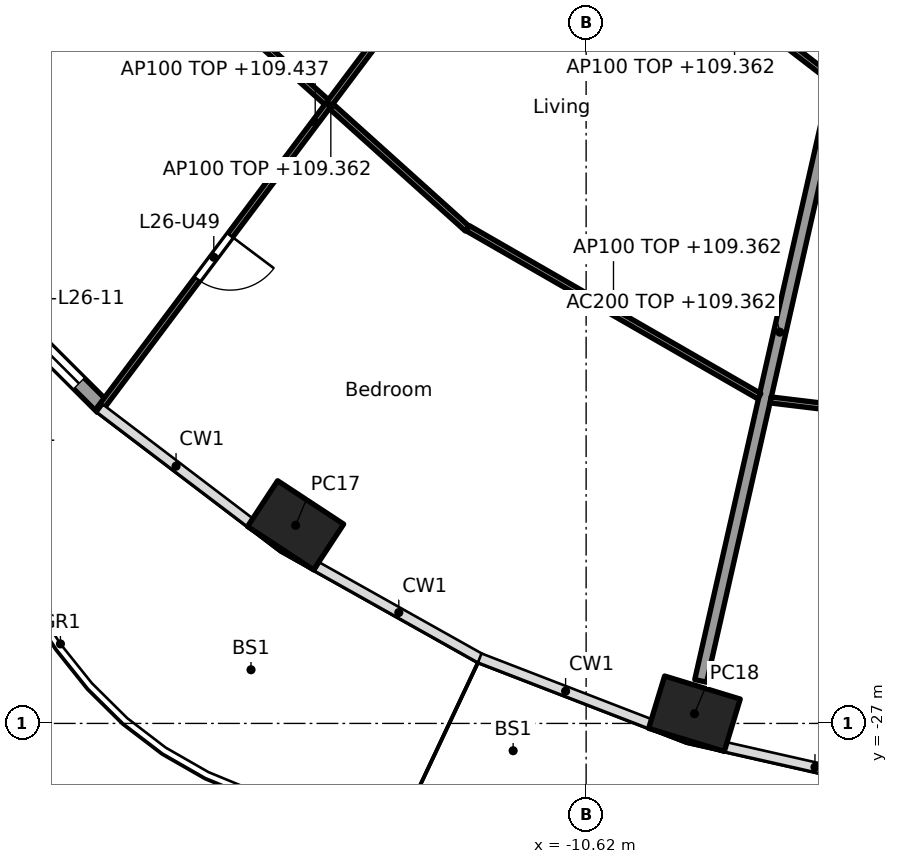
"""IFC4 building model, lengths in metres.
Left out: names, types, materials, properties, quantities, classifications, styles, units other than length and angle.
Written with IfcOpenShell. Run it as: python <this file> out.ifc"""

import sys

from ifc_helpers import new_model, si_unit, direction, frame, frame_2d, origin, origin_2d, place, context, subcontext, project, spatial, rectangle, hollow_rectangle, extrude, element, fill, save


model = new_model("IFC4")
c1 = context("Model", 3, precision=1e-05, world=origin(), true_north=direction((0.0, 1.0)))
c2 = subcontext(c1, "Body", "Model", "MODEL_VIEW")
j1 = project(units=[si_unit("LENGTHUNIT", "METRE"), si_unit("PLANEANGLEUNIT", "RADIAN")], contexts=[c1])
p1 = place(None, origin())
s1 = spatial("IfcSite", under=j1, at=p1, CompositionType="ELEMENT")
p2 = place(p1, origin())
s2 = spatial("IfcBuilding", under=s1, at=p2, CompositionType="ELEMENT")
p3 = place(p2, frame((0.0, 0.0, 106.6)))
s3 = spatial("IfcBuildingStorey", under=s2, at=p3, CompositionType="ELEMENT", Elevation=106.6)
for number, where, z_axis, x_axis in (
    (1, (-15.397, -23.742, 0.0), (0.0, 0.0, 1.0), (0.836, -0.549, 0.0)),
    (2, (-8.839, -26.841, 0.0), (0.0, 0.0, 1.0), (0.957, -0.292, 0.0)),
):
    element("IfcColumn", number, at=place(p3, frame(where, z_axis=z_axis, x_axis=x_axis)), inside=s3, PredefinedType="COLUMN", context=c2, shape_type="SweptSolid", body=[
        extrude(hollow_rectangle(XDim=1.3, YDim=0.9, WallThickness=0.045, at=origin_2d()), origin(), (0.0, 0.0, 1.0), 3.7),
    ])
p4 = place(p3, frame((-18.571, -21.796, 0.0), z_axis=(0.0, 0.0, 1.0), x_axis=(-0.707831646613, 0.706381171927, 0.0)))
e3 = element("IfcWall", 3, at=p4, inside=s3, PredefinedType="SOLIDWALL", context=c2, shape_type="SweptSolid", body=[
    extrude(rectangle(XDim=3.198, YDim=0.25, at=frame_2d((1.599, 0.0))), origin(), (0.0, 0.0, 1.0), 3.44),
])
p5 = place(p4, frame((0.549, 0.0, 0.0)))
e4 = element("IfcOpeningElement", 4, at=p5, cuts=e3, PredefinedType="OPENING", context=c2, shape_type="SweptSolid", body=[
    extrude(rectangle(XDim=2.1, YDim=2.4, at=frame_2d((1.05, 1.2))), frame((0.0, 0.135, 0.0), z_axis=(0.0, -1.0, 0.0), x_axis=(1.0, 0.0, 0.0)), (0.0, 0.0, 1.0), 0.27),
])
p6 = place(p3, frame((-6.134, -14.831, 0.0), z_axis=(0.0, 0.0, 1.0), x_axis=(-0.221225405869, -0.975222702667, 0.0)))
e5 = element("IfcWall", 5, at=p6, inside=s3, PredefinedType="PARTITIONING", context=c2, shape_type="SweptSolid", body=[
    extrude(rectangle(XDim=11.761, YDim=0.2, at=frame_2d((5.88, 0.0))), origin(), (0.0, 0.0, 1.0), 2.762),
])
p7 = place(p3, frame((-17.063, -14.827, 0.0), z_axis=(0.0, 0.0, 1.0), x_axis=(0.743485143578, -0.668752451419, 0.0)))
e6 = element("IfcWall", 6, at=p7, inside=s3, PredefinedType="PARTITIONING", context=c2, shape_type="SweptSolid", body=[
    extrude(rectangle(XDim=6.037, YDim=0.1, at=frame_2d((3.019, 0.0))), origin(), (0.0, 0.0, 1.0), 2.762),
])
p8 = place(p3, frame((-11.515, -12.377, 0.0), z_axis=(0.0, 0.0, 1.0), x_axis=(-0.600741245554, -0.799443528893, 0.0)))
e7 = element("IfcWall", 7, at=p8, inside=s3, PredefinedType="PARTITIONING", context=c2, shape_type="SweptSolid", body=[
    extrude(rectangle(XDim=11.853, YDim=0.1, at=frame_2d((5.927, 0.0))), origin(), (0.0, 0.0, 1.0), 2.837),
])
p9 = place(p8, frame((8.253, 0.0, 0.0)))
e8 = element("IfcOpeningElement", 8, at=p9, cuts=e7, PredefinedType="OPENING", context=c2, shape_type="SweptSolid", body=[
    extrude(rectangle(XDim=0.9, YDim=2.1, at=frame_2d((0.45, 1.05))), frame((0.0, 0.06, 0.0), z_axis=(0.0, -1.0, 0.0), x_axis=(1.0, 0.0, 0.0)), (0.0, 0.0, 1.0), 0.12),
])
p10 = place(p8, frame((2.326, 0.0, 0.0)))
e9 = element("IfcOpeningElement", 9, at=p10, cuts=e7, PredefinedType="OPENING", context=c2, shape_type="SweptSolid", body=[
    extrude(rectangle(XDim=0.9, YDim=2.1, at=frame_2d((0.45, 1.05))), frame((0.0, 0.06, 0.0), z_axis=(0.0, -1.0, 0.0), x_axis=(1.0, 0.0, 0.0)), (0.0, 0.0, 1.0), 0.12),
])
p11 = place(p3, frame((-9.775, -13.939, 0.0), z_axis=(0.0, 0.0, 1.0), x_axis=(0.792162117554, -0.610310723741, 0.0)))
e10 = element("IfcWall", 10, at=p11, inside=s3, PredefinedType="PARTITIONING", context=c2, shape_type="SweptSolid", body=[
    extrude(rectangle(XDim=4.03, YDim=0.1, at=frame_2d((2.015, 0.0))), origin(), (0.0, 0.0, 1.0), 2.762),
])
p12 = place(p11, frame((0.836, 0.0, 0.0)))
e11 = element("IfcOpeningElement", 11, at=p12, cuts=e10, PredefinedType="OPENING", context=c2, shape_type="SweptSolid", body=[
    extrude(rectangle(XDim=0.9, YDim=2.1, at=frame_2d((0.45, 1.05))), frame((0.0, 0.06, 0.0), z_axis=(0.0, -1.0, 0.0), x_axis=(1.0, 0.0, 0.0)), (0.0, 0.0, 1.0), 0.12),
])
p13 = place(p3, frame((-12.568, -18.856, 0.0), z_axis=(0.0, 0.0, 1.0), x_axis=(0.866533437451, -0.499119025664, 0.0)))
e12 = element("IfcWall", 12, at=p13, inside=s3, PredefinedType="PARTITIONING", context=c2, shape_type="SweptSolid", body=[
    extrude(rectangle(XDim=5.535, YDim=0.1, at=frame_2d((2.768, 0.0))), origin(), (0.0, 0.0, 1.0), 2.762),
])
p14 = place(p3, frame((-7.586, -21.68, 0.0), z_axis=(0.0, 0.0, 1.0), x_axis=(0.992810535213, -0.119696454295, 0.0)))
e13 = element("IfcWall", 13, at=p14, inside=s3, PredefinedType="PARTITIONING", context=c2, shape_type="SweptSolid", body=[
    extrude(rectangle(XDim=5.903, YDim=0.1, at=frame_2d((2.951, 0.0))), origin(), (0.0, 0.0, 1.0), 2.762),
])
p15 = place(p14, frame((3.915, 0.0, 0.0)))
e14 = element("IfcOpeningElement", 14, at=p15, cuts=e13, PredefinedType="OPENING", context=c2, shape_type="SweptSolid", body=[
    extrude(rectangle(XDim=0.9, YDim=2.1, at=frame_2d((0.45, 1.05))), frame((0.0, 0.06, 0.0), z_axis=(0.0, -1.0, 0.0), x_axis=(1.0, 0.0, 0.0)), (0.0, 0.0, 1.0), 0.12),
])
p16 = place(p5, origin())
e15 = element("IfcDoor", 15, at=p16, inside=s3, OperationType="SLIDING_TO_LEFT", PredefinedType="DOOR", context=c2, shape_type="SweptSolid", body=[
    extrude(rectangle(XDim=2.1, YDim=2.4, at=frame_2d((1.05, 1.2))), frame((0.0, 0.025, 0.0), z_axis=(0.0, -1.0, 0.0), x_axis=(1.0, 0.0, 0.0)), (0.0, 0.0, 1.0), 0.05),
])
fill(e4, e15)
p17 = place(p9, origin())
e16 = element("IfcDoor", 16, at=p17, inside=s3, OperationType="SINGLE_SWING_LEFT", PredefinedType="DOOR", context=c2, shape_type="SweptSolid", body=[
    extrude(rectangle(XDim=0.9, YDim=2.1, at=frame_2d((0.45, 1.05))), frame((0.0, 0.025, 0.0), z_axis=(0.0, -1.0, 0.0), x_axis=(1.0, 0.0, 0.0)), (0.0, 0.0, 1.0), 0.05),
])
fill(e8, e16)
save(model, sys.argv[1])
